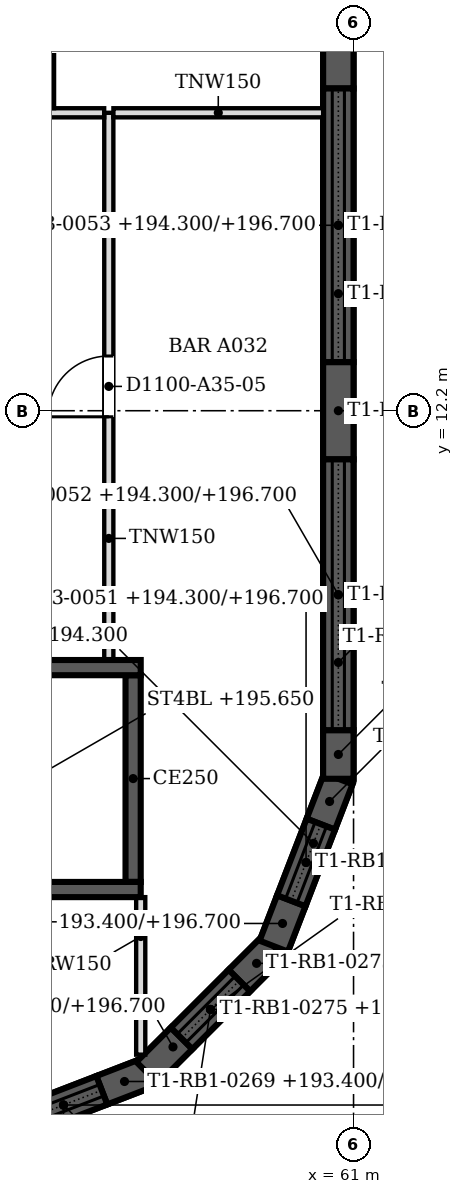
"""IFC4 building model, lengths in metres.
Left out: names, types, materials, properties, quantities, classifications, styles, units other than length and angle.
Written with IfcOpenShell. Run it as: python <this file> out.ifc"""

import sys

from ifc_helpers import new_model, si_unit, direction, frame, frame_2d, origin, place, context, subcontext, project, spatial, polyline, rectangle, outline, extrude, faceted_brep, source, transform, mapped, element, fill, save


model = new_model("IFC4")
c1 = context("Model", 3, precision=1e-05, world=origin(), true_north=direction((0.0, 1.0)))
c2 = subcontext(c1, "Body", "Model", "MODEL_VIEW")
j1 = project(units=[si_unit("LENGTHUNIT", "METRE"), si_unit("PLANEANGLEUNIT", "RADIAN")], contexts=[c1])
p1 = place(None, origin())
s1 = spatial("IfcSite", under=j1, at=p1, CompositionType="ELEMENT")
p2 = place(p1, origin())
s2 = spatial("IfcBuilding", under=s1, at=p2, CompositionType="ELEMENT")
p3 = place(p2, frame((0.0, 0.0, 193.4)))
s3 = spatial("IfcBuildingStorey", under=s2, at=p3, CompositionType="ELEMENT", Elevation=193.4)
m1 = source(origin(), c2, "Body", "Brep", [
    faceted_brep([(0.0, -0.25, 0.0), (0.8, -0.25, 0.0), (0.8, -0.25, 3.3), (0.0, -0.25, 3.3), (0.0, 0.25, 3.3), (0.747, 0.25, 3.3), (0.747, 0.25, 0.0), (0.0, 0.25, 0.0), (0.8, -0.0, 0.0), (0.8, -0.0, 3.3)], [[[0, 1, 2, 3]], [[4, 5, 6, 7]], [[7, 6, 8, 1, 0]], [[9, 2, 1, 8]], [[5, 4, 3, 2, 9]], [[4, 7, 0, 3]], [[8, 6, 5, 9]]]),
])
p4 = place(p3, frame((56.86, 1.024, 0.0), z_axis=(0.0, 0.0, 1.0), x_axis=(0.932912338632, 0.360103552367, 0.0)))
e1 = element("IfcWall", 1, at=p4, inside=s3, PredefinedType="SOLIDWALL", context=c2, shape_type="MappedRepresentation", body=[
    mapped(m1, transform((0.0, 0.0, 0.0), scale=1.0)),
])
m2 = source(origin(), c2, "Body", "SweptSolid", [
    extrude(outline(polyline([(0.0, 0.0), (1.351, 0.0), (1.351, 0.9), (0.0, 0.9), (0.0, 0.0)])), frame((0.0, 0.25, 0.0), z_axis=(0.0, -1.0, 0.0), x_axis=(1.0, 0.0, 0.0)), (0.0, 0.0, 1.0), 0.5),
])
p5 = place(p3, frame((55.6, 0.538, 0.0), z_axis=(0.0, 0.0, 1.0), x_axis=(0.932981713512, 0.359923772835, 0.0)))
e2 = element("IfcWall", 2, at=p5, inside=s3, PredefinedType="SOLIDWALL", context=c2, shape_type="MappedRepresentation", body=[
    mapped(m2, transform((0.0, 0.0, 0.0), scale=1.0)),
])
m3 = source(origin(), c2, "Body", "Brep", [
    faceted_brep([(0.0, -0.25, 0.0), (2.95, -0.25, 0.0), (2.95, -0.25, 1.2), (0.0, -0.25, 1.2), (0.047, 0.25, 1.2), (2.898, 0.25, 1.2), (2.898, 0.25, 0.0), (0.047, 0.25, 0.0), (2.95, 0.0, 0.0), (0.0, 0.0, 0.0), (2.95, 0.0, 1.2), (0.0, 0.0, 1.2)], [[[0, 1, 2, 3]], [[4, 5, 6, 7]], [[7, 6, 8, 1, 0, 9]], [[10, 2, 1, 8]], [[5, 4, 11, 3, 2, 10]], [[9, 0, 3, 11]], [[7, 9, 11, 4]], [[8, 6, 5, 10]]]),
])
p6 = place(p3, frame((54.854, 0.25, 3.3), z_axis=(0.0, 0.0, 1.0), x_axis=(0.932999673775, 0.359877213415, 0.0)))
e3 = element("IfcWall", 3, at=p6, inside=s3, PredefinedType="SOLIDWALL", context=c2, shape_type="MappedRepresentation", body=[
    mapped(m3, transform((0.0, 0.0, 0.0), scale=1.0)),
])
m4 = source(origin(), c2, "Body", "Brep", [
    faceted_brep([(0.0, -0.25, 0.0), (0.8, -0.25, 0.0), (0.8, -0.25, 3.3), (0.0, -0.25, 3.3), (0.053, 0.25, 3.3), (0.8, 0.25, 3.3), (0.8, 0.25, 0.0), (0.053, 0.25, 0.0), (0.0, 0.0, 0.0), (0.0, 0.0, 3.3)], [[[0, 1, 2, 3]], [[4, 5, 6, 7]], [[7, 6, 1, 0, 8]], [[5, 4, 9, 3, 2]], [[8, 0, 3, 9]], [[7, 8, 9, 4]], [[1, 6, 5, 2]]]),
])
p7 = place(p3, frame((57.606, 1.312, 0.0), z_axis=(0.0, 0.0, 1.0), x_axis=(0.707106781187, 0.707106781187, 0.0)))
e4 = element("IfcWall", 4, at=p7, inside=s3, PredefinedType="SOLIDWALL", context=c2, shape_type="MappedRepresentation", body=[
    mapped(m4, transform((0.0, 0.0, 0.0), scale=1.0)),
])
p8 = place(p3, frame((59.122, 2.828, 0.0), z_axis=(0.0, 0.0, 1.0), x_axis=(0.707259322823, 0.706954206636, 0.0)))
e5 = element("IfcWall", 5, at=p8, inside=s3, PredefinedType="SOLIDWALL", context=c2, shape_type="MappedRepresentation", body=[
    mapped(m1, transform((0.0, 0.0, 0.0), scale=1.0)),
])
m5 = source(origin(), c2, "Body", "SweptSolid", [
    extrude(outline(polyline([(0.0, 0.0), (1.344, 0.0), (1.344, 0.9), (0.0, 0.9), (0.0, 0.0)])), frame((0.0, 0.25, 0.0), z_axis=(0.0, -1.0, 0.0), x_axis=(1.0, 0.0, 0.0)), (0.0, 0.0, 1.0), 0.5),
])
p9 = place(p3, frame((58.172, 1.878, 0.0), z_axis=(0.0, 0.0, 1.0), x_axis=(0.707106781187, 0.707106781187, 0.0)))
e6 = element("IfcWall", 6, at=p9, inside=s3, PredefinedType="SOLIDWALL", context=c2, shape_type="MappedRepresentation", body=[
    mapped(m5, transform((0.0, 0.0, 0.0), scale=1.0)),
])
m6 = source(origin(), c2, "Body", "Brep", [
    faceted_brep([(0.0, -0.25, 0.0), (2.944, -0.25, 0.0), (2.944, -0.25, 1.2), (0.0, -0.25, 1.2), (0.053, 0.25, 1.2), (2.891, 0.25, 1.2), (2.891, 0.25, 0.0), (0.053, 0.25, 0.0), (2.944, 0.0, 0.0), (0.0, 0.0, 0.0), (2.944, 0.0, 1.2), (0.0, 0.0, 1.2)], [[[0, 1, 2, 3]], [[4, 5, 6, 7]], [[7, 6, 8, 1, 0, 9]], [[10, 2, 1, 8]], [[5, 4, 11, 3, 2, 10]], [[9, 0, 3, 11]], [[7, 9, 11, 4]], [[8, 6, 5, 10]]]),
])
p10 = place(p3, frame((57.606, 1.312, 3.3), z_axis=(0.0, 0.0, 1.0), x_axis=(0.707106781187, 0.707106781187, 0.0)))
e7 = element("IfcWall", 7, at=p10, inside=s3, PredefinedType="SOLIDWALL", context=c2, shape_type="MappedRepresentation", body=[
    mapped(m6, transform((0.0, 0.0, 0.0), scale=1.0)),
])
p11 = place(p3, frame((59.688, 3.394, 0.0), z_axis=(0.0, 0.0, 1.0), x_axis=(0.360103552367, 0.932912338632, 0.0)))
e8 = element("IfcWall", 8, at=p11, inside=s3, PredefinedType="SOLIDWALL", context=c2, shape_type="MappedRepresentation", body=[
    mapped(m4, transform((0.0, 0.0, 0.0), scale=1.0)),
])
m7 = source(origin(), c2, "Body", "Brep", [
    faceted_brep([(0.0, -0.25, 0.0), (0.8, -0.25, 0.0), (0.8, -0.25, 3.3), (0.0, -0.25, 3.3), (0.0, 0.25, 3.3), (0.753, 0.25, 3.3), (0.753, 0.25, 0.0), (0.0, 0.25, 0.0), (0.8, -0.0, 0.0), (0.8, -0.0, 3.3)], [[[0, 1, 2, 3]], [[4, 5, 6, 7]], [[7, 6, 8, 1, 0]], [[9, 2, 1, 8]], [[5, 4, 3, 2, 9]], [[4, 7, 0, 3]], [[8, 6, 5, 9]]]),
])
p12 = place(p3, frame((60.462, 5.4, 0.0), z_axis=(0.0, 0.0, 1.0), x_axis=(0.3598379092, 0.93301483327, 0.0)))
e9 = element("IfcWall", 9, at=p12, inside=s3, PredefinedType="SOLIDWALL", context=c2, shape_type="MappedRepresentation", body=[
    mapped(m7, transform((0.0, 0.0, 0.0), scale=1.0)),
])
p13 = place(p3, frame((59.976, 4.14, 0.0), z_axis=(0.0, 0.0, 1.0), x_axis=(0.359923772835, 0.932981713512, 0.0)))
e10 = element("IfcWall", 10, at=p13, inside=s3, PredefinedType="SOLIDWALL", context=c2, shape_type="MappedRepresentation", body=[
    mapped(m2, transform((0.0, 0.0, 0.0), scale=1.0)),
])
m8 = source(origin(), c2, "Body", "Brep", [
    faceted_brep([(0.0, -0.25, 0.0), (2.95, -0.25, 0.0), (2.95, -0.25, 1.2), (0.0, -0.25, 1.2), (0.053, 0.25, 1.2), (2.904, 0.25, 1.2), (2.904, 0.25, 0.0), (0.053, 0.25, 0.0), (2.95, 0.0, 0.0), (0.0, 0.0, 0.0), (2.95, 0.0, 1.2), (0.0, 0.0, 1.2)], [[[0, 1, 2, 3]], [[4, 5, 6, 7]], [[7, 6, 8, 1, 0, 9]], [[10, 2, 1, 8]], [[5, 4, 11, 3, 2, 10]], [[9, 0, 3, 11]], [[7, 9, 11, 4]], [[8, 6, 5, 10]]]),
])
p14 = place(p3, frame((59.688, 3.394, 3.3), z_axis=(0.0, 0.0, 1.0), x_axis=(0.359949242603, 0.932971887438, 0.0)))
e11 = element("IfcWall", 11, at=p14, inside=s3, PredefinedType="SOLIDWALL", context=c2, shape_type="MappedRepresentation", body=[
    mapped(m8, transform((0.0, 0.0, 0.0), scale=1.0)),
])
m9 = source(origin(), c2, "Body", "Brep", [
    faceted_brep([(0.0, -0.25, 0.0), (0.8, -0.25, 0.0), (0.8, -0.25, 3.3), (0.0, -0.25, 3.3), (0.047, 0.25, 3.3), (0.8, 0.25, 3.3), (0.8, 0.25, 0.0), (0.047, 0.25, 0.0), (0.0, 0.0, 0.0), (0.0, 0.0, 3.3)], [[[0, 1, 2, 3]], [[4, 5, 6, 7]], [[7, 6, 1, 0, 8]], [[5, 4, 9, 3, 2]], [[8, 0, 3, 9]], [[7, 8, 9, 4]], [[1, 6, 5, 2]]]),
])
p15 = place(p3, frame((60.75, 6.146, 0.0), z_axis=(0.0, 0.0, 1.0), x_axis=(0.0, 1.0, 0.0)))
e12 = element("IfcWall", 12, at=p15, inside=s3, PredefinedType="SOLIDWALL", context=c2, shape_type="MappedRepresentation", body=[
    mapped(m9, transform((0.0, 0.0, 0.0), scale=1.0)),
])
m10 = source(origin(), c2, "Body", "SweptSolid", [
    extrude(outline(polyline([(0.0, 0.0), (1.6, 0.0), (1.6, 3.3), (0.0, 3.3), (0.0, 0.0)])), frame((0.0, 0.25, 0.0), z_axis=(0.0, -1.0, 0.0), x_axis=(1.0, 0.0, 0.0)), (0.0, 0.0, 1.0), 0.5),
])
for number, where, z_axis, x_axis in (
    (13, (60.75, 11.4, 0.0), (0.0, 0.0, 1.0), (0.0, 1.0, 0.0)),
    (14, (60.75, 17.5, 0.0), (0.0, 0.0, 1.0), (0.0, 1.0, 0.0)),
):
    element("IfcWall", number, at=place(p3, frame(where, z_axis=z_axis, x_axis=x_axis)), inside=s3, PredefinedType="SOLIDWALL", context=c2, shape_type="MappedRepresentation", body=[
        mapped(m10, transform((0.0, 0.0, 0.0), scale=1.0)),
    ])
m11 = source(origin(), c2, "Body", "SweptSolid", [
    extrude(outline(polyline([(0.0, 0.0), (4.453, 0.0), (4.453, 0.9), (0.0, 0.9), (0.0, 0.0)])), frame((0.0, 0.25, 0.0), z_axis=(0.0, -1.0, 0.0), x_axis=(1.0, 0.0, 0.0)), (0.0, 0.0, 1.0), 0.5),
])
p16 = place(p3, frame((60.75, 6.947, 0.0), z_axis=(0.0, 0.0, 1.0), x_axis=(0.0, 1.0, 0.0)))
e15 = element("IfcWall", 15, at=p16, inside=s3, PredefinedType="SOLIDWALL", context=c2, shape_type="MappedRepresentation", body=[
    mapped(m11, transform((0.0, 0.0, 0.0), scale=1.0)),
])
m12 = source(origin(), c2, "Body", "Brep", [
    faceted_brep([(0.0, -0.25, 0.0), (6.053, -0.25, 0.0), (6.053, -0.25, 1.2), (0.0, -0.25, 1.2), (0.047, 0.25, 1.2), (6.053, 0.25, 1.2), (6.053, 0.25, 0.0), (0.047, 0.25, 0.0), (0.0, 0.0, 0.0), (0.0, 0.0, 1.2)], [[[0, 1, 2, 3]], [[4, 5, 6, 7]], [[7, 6, 1, 0, 8]], [[5, 4, 9, 3, 2]], [[8, 0, 3, 9]], [[7, 8, 9, 4]], [[1, 6, 5, 2]]]),
])
p17 = place(p3, frame((60.75, 6.146, 3.3), z_axis=(0.0, 0.0, 1.0), x_axis=(0.0, 1.0, 0.0)))
e16 = element("IfcWall", 16, at=p17, inside=s3, PredefinedType="SOLIDWALL", context=c2, shape_type="MappedRepresentation", body=[
    mapped(m12, transform((0.0, 0.0, 0.0), scale=1.0)),
])
m13 = source(origin(), c2, "Body", "SweptSolid", [
    extrude(outline(polyline([(0.0, 0.0), (4.5, 0.0), (4.5, 0.9), (0.0, 0.9), (0.0, 0.0)])), frame((0.0, 0.25, 0.0), z_axis=(0.0, -1.0, 0.0), x_axis=(1.0, 0.0, 0.0)), (0.0, 0.0, 1.0), 0.5),
])
p18 = place(p3, frame((60.75, 13.0, 0.0), z_axis=(0.0, 0.0, 1.0), x_axis=(0.0, 1.0, 0.0)))
e17 = element("IfcWall", 17, at=p18, inside=s3, PredefinedType="SOLIDWALL", context=c2, shape_type="MappedRepresentation", body=[
    mapped(m13, transform((0.0, 0.0, 0.0), scale=1.0)),
])
m14 = source(origin(), c2, "Body", "SweptSolid", [
    extrude(outline(polyline([(0.0, 0.0), (6.1, 0.0), (6.1, 1.2), (0.0, 1.2), (0.0, 0.0)])), frame((0.0, 0.25, 0.0), z_axis=(0.0, -1.0, 0.0), x_axis=(1.0, 0.0, 0.0)), (0.0, 0.0, 1.0), 0.5),
])
p19 = place(p3, frame((60.75, 12.2, 3.3), z_axis=(0.0, 0.0, 1.0), x_axis=(0.0, 1.0, 0.0)))
e18 = element("IfcWall", 18, at=p19, inside=s3, PredefinedType="SOLIDWALL", context=c2, shape_type="MappedRepresentation", body=[
    mapped(m14, transform((0.0, 0.0, 0.0), scale=1.0)),
])
p20 = place(p3, frame((57.5, 4.325, 0.0), z_axis=(0.0, 0.0, 1.0), x_axis=(-1.0, 0.0, 0.0)))
e19 = element("IfcWall", 19, at=p20, inside=s3, PredefinedType="SOLIDWALL", context=c2, shape_type="SweptSolid", body=[
    extrude(rectangle(XDim=8.5, YDim=0.25, at=frame_2d((4.25, 0.0))), origin(), (0.0, 0.0, 1.0), 4.5),
])
m15 = source(origin(), c2, "Body", "SweptSolid", [
    extrude(rectangle(XDim=1.2, YDim=2.1, at=frame_2d((0.6, 1.05))), frame((0.0, 0.135, 0.0), z_axis=(0.0, -1.0, 0.0), x_axis=(1.0, 0.0, 0.0)), (0.0, 0.0, 1.0), 0.27),
])
p21 = place(p20, frame((6.9, 0.0, 0.0)))
e20 = element("IfcOpeningElement", 20, at=p21, cuts=e19, PredefinedType="OPENING", context=c2, shape_type="MappedRepresentation", body=[
    mapped(m15, transform((0.0, 0.0, 0.0), scale=1.0)),
])
p22 = place(p3, frame((49.0, 7.975, 0.0), z_axis=(0.0, 0.0, 1.0), x_axis=(1.0, 0.0, 0.0)))
e21 = element("IfcWall", 21, at=p22, inside=s3, PredefinedType="SOLIDWALL", context=c2, shape_type="SweptSolid", body=[
    extrude(rectangle(XDim=8.5, YDim=0.25, at=frame_2d((4.25, 0.0))), origin(), (0.0, 0.0, 1.0), 4.5),
])
p23 = place(p3, frame((57.375, 7.85, 0.0), z_axis=(0.0, 0.0, 1.0), x_axis=(0.0, -1.0, 0.0)))
e22 = element("IfcWall", 22, at=p23, inside=s3, PredefinedType="SOLIDWALL", context=c2, shape_type="SweptSolid", body=[
    extrude(rectangle(XDim=3.4, YDim=0.25, at=frame_2d((1.7, 0.0))), origin(), (0.0, 0.0, 1.0), 4.5),
])
p24 = place(p3, frame((57.5, 1.609, 0.0), z_axis=(0.0, 0.0, 1.0), x_axis=(0.0, 1.0, 0.0)))
e23 = element("IfcWall", 23, at=p24, inside=s3, PredefinedType="PARTITIONING", context=c2, shape_type="SweptSolid", body=[
    extrude(rectangle(XDim=2.591, YDim=0.15, at=frame_2d((1.295, 0.0))), origin(), (0.0, 0.0, 1.0), 3.767),
])
p25 = place(p3, frame((56.975, 17.1, 0.0), z_axis=(0.0, 0.0, 1.0), x_axis=(0.0, -1.0, 0.0)))
e24 = element("IfcWall", 24, at=p25, inside=s3, PredefinedType="PARTITIONING", context=c2, shape_type="SweptSolid", body=[
    extrude(rectangle(XDim=9.0, YDim=0.15, at=frame_2d((4.5, 0.0))), origin(), (0.0, 0.0, 1.0), 3.767),
])
m16 = source(origin(), c2, "Body", "SweptSolid", [
    extrude(rectangle(XDim=1.0, YDim=2.1, at=frame_2d((0.5, 1.05))), frame((0.0, 0.085, 0.0), z_axis=(0.0, -1.0, 0.0), x_axis=(1.0, 0.0, 0.0)), (0.0, 0.0, 1.0), 0.17),
])
p26 = place(p25, frame((4.0, 0.0, 0.0)))
e25 = element("IfcOpeningElement", 25, at=p26, cuts=e24, PredefinedType="OPENING", context=c2, shape_type="MappedRepresentation", body=[
    mapped(m16, transform((0.0, 0.0, 0.0), scale=1.0)),
])
p27 = place(p3, frame((46.476, 17.1, 0.0), z_axis=(0.0, 0.0, 1.0), x_axis=(1.0, 0.0, 0.0)))
e26 = element("IfcWall", 26, at=p27, inside=s3, PredefinedType="PARTITIONING", context=c2, shape_type="SweptSolid", body=[
    extrude(rectangle(XDim=10.423, YDim=0.15, at=frame_2d((5.211, 0.0))), origin(), (0.0, 0.0, 1.0), 3.767),
])
p28 = place(p3, frame((57.051, 17.1, 0.0), z_axis=(0.0, 0.0, 1.0), x_axis=(1.0, 0.0, 0.0)))
e27 = element("IfcWall", 27, at=p28, inside=s3, PredefinedType="PARTITIONING", context=c2, shape_type="SweptSolid", body=[
    extrude(rectangle(XDim=3.449, YDim=0.15, at=frame_2d((1.725, 0.0))), origin(), (0.0, 0.0, 1.0), 3.767),
])
p29 = place(p3, frame((56.0, 21.924, 0.0), z_axis=(0.0, 0.0, 1.0), x_axis=(0.0, -1.0, 0.0)))
e28 = element("IfcWall", 28, at=p29, inside=s3, PredefinedType="PARTITIONING", context=c2, shape_type="SweptSolid", body=[
    extrude(rectangle(XDim=4.748, YDim=0.15, at=frame_2d((2.374, 0.0))), origin(), (0.0, 0.0, 1.0), 3.767),
])
m17 = source(origin(), c2, "Body", "SweptSolid", [
    extrude(rectangle(XDim=0.9, YDim=2.1, at=frame_2d((0.45, 1.05))), frame((0.0, 0.085, 0.0), z_axis=(0.0, -1.0, 0.0), x_axis=(1.0, 0.0, 0.0)), (0.0, 0.0, 1.0), 0.17),
])
p30 = place(p29, frame((1.948, 0.0, 0.0)))
e29 = element("IfcOpeningElement", 29, at=p30, cuts=e28, PredefinedType="OPENING", context=c2, shape_type="MappedRepresentation", body=[
    mapped(m17, transform((0.0, 0.0, 0.0), scale=1.0)),
])
m18 = source(origin(), c2, "Body", "SweptSolid", [
    extrude(rectangle(XDim=1.0, YDim=2.1, at=frame_2d((0.5, 1.05))), frame((0.0, 0.025, 0.0), z_axis=(0.0, -1.0, 0.0), x_axis=(1.0, 0.0, 0.0)), (0.0, 0.0, 1.0), 0.05),
])
p31 = place(p26, origin())
e30 = element("IfcDoor", 30, at=p31, inside=s3, OperationType="SINGLE_SWING_RIGHT", PredefinedType="DOOR", context=c2, shape_type="MappedRepresentation", body=[
    mapped(m18, transform((0.0, 0.0, 0.0), scale=1.0)),
])
fill(e25, e30)
save(model, sys.argv[1])
